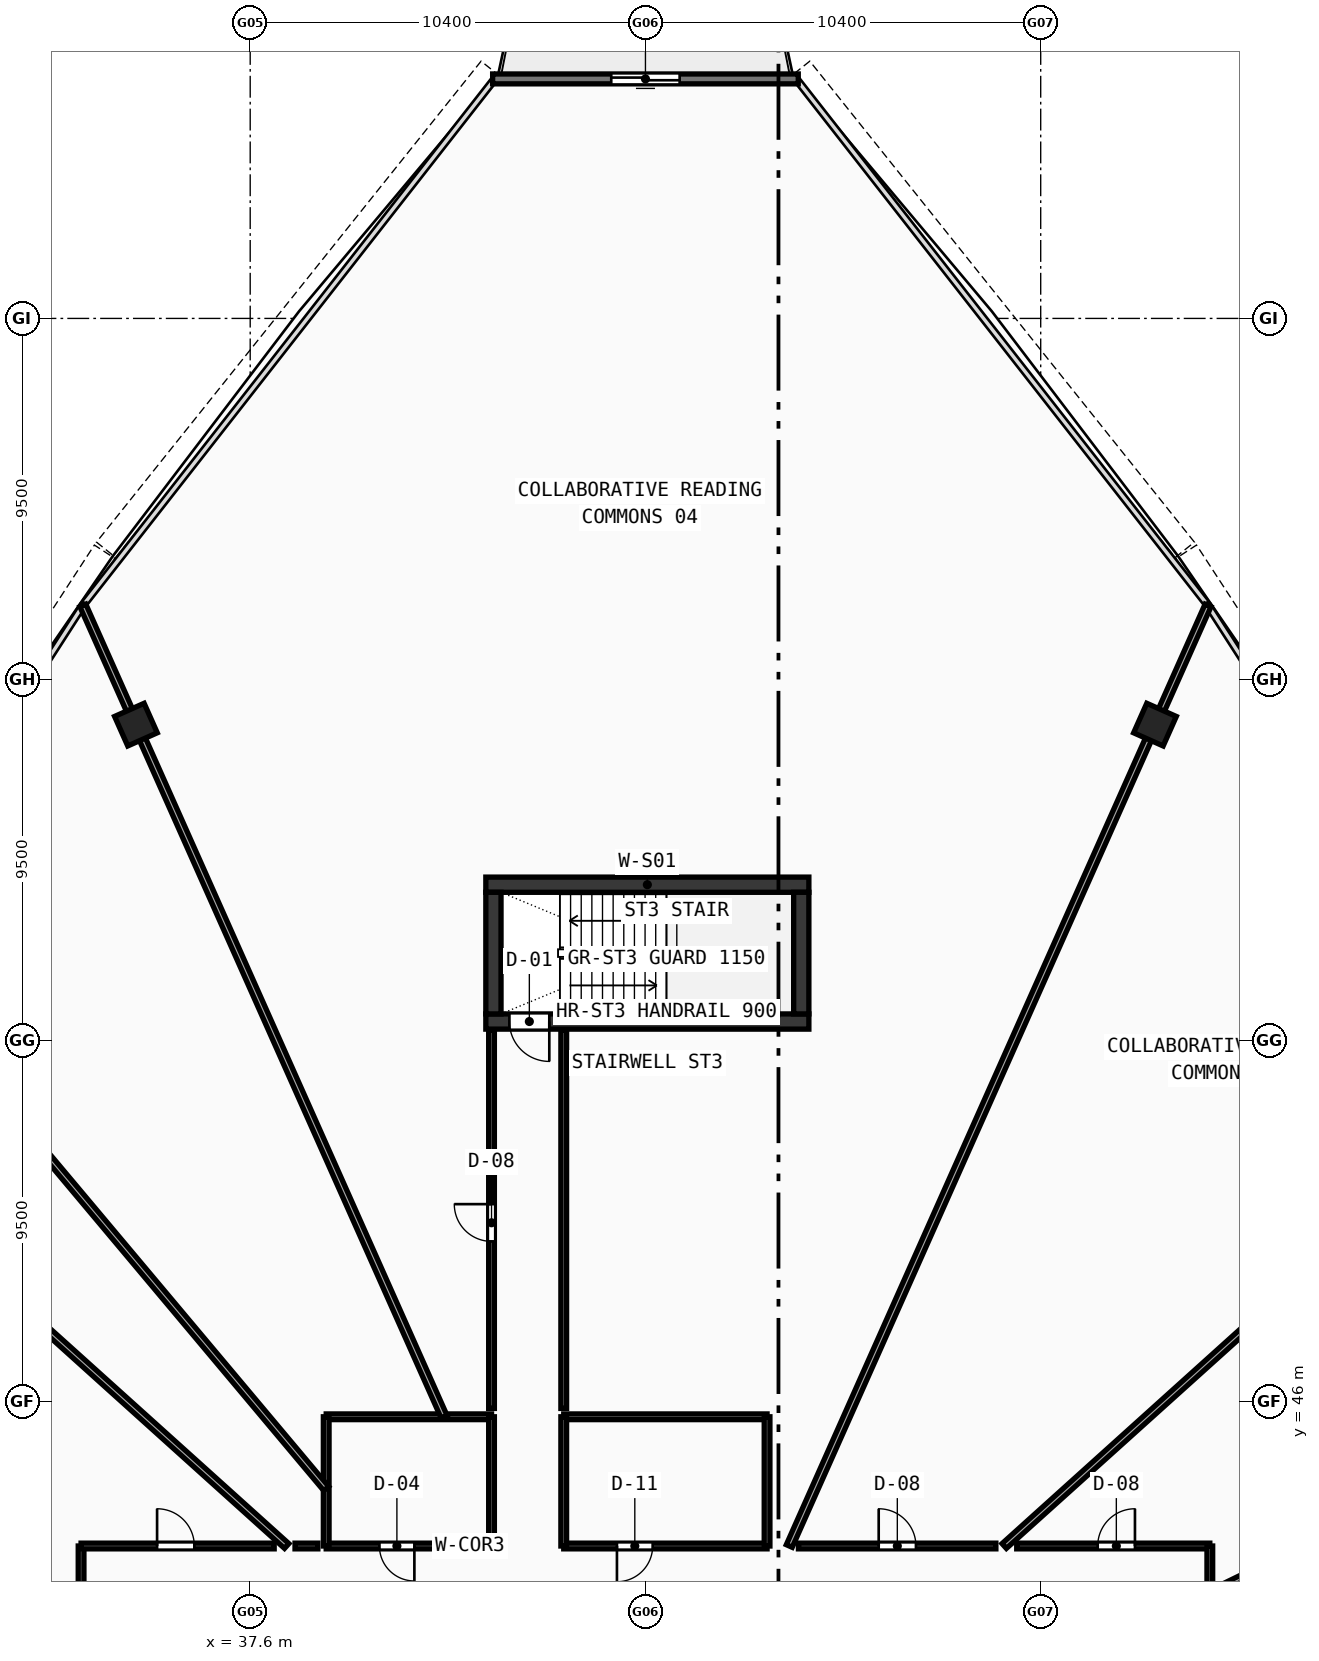
"""IFC4 building model, lengths in metres.
Left out: names, types, materials, properties, quantities, classifications, styles, units other than length and angle.
Written with IfcOpenShell. Run it as: python <this file> out.ifc"""

import sys

from ifc_helpers import new_model, si_unit, direction, frame, frame_2d, origin, origin_with_axes, origin_2d, place, context, subcontext, project, spatial, rectangle, hollow_rectangle, extrude, source, transform, mapped, element, fill, save


model = new_model("IFC4")
c1 = context("Model", 3, precision=1e-05, world=origin(), true_north=direction((0.0, 1.0)))
c2 = subcontext(c1, "Body", "Model", "MODEL_VIEW")
j1 = project(units=[si_unit("LENGTHUNIT", "METRE"), si_unit("PLANEANGLEUNIT", "RADIAN")], contexts=[c1])
p1 = place(None, origin())
s1 = spatial("IfcSite", under=j1, at=p1, CompositionType="ELEMENT")
p2 = place(p1, origin())
s2 = spatial("IfcBuilding", under=s1, at=p2, CompositionType="ELEMENT")
p3 = place(p2, frame((0.0, 0.0, 229.61)))
s3 = spatial("IfcBuildingStorey", under=s2, at=p3, CompositionType="ELEMENT", Elevation=229.61)
p4 = place(p3, frame((43.8, 59.6, 0.0), z_axis=(0.0, 0.0, 1.0), x_axis=(1.0, 0.0, 0.0)))
e1 = element("IfcWall", 1, at=p4, inside=s3, PredefinedType="SHEAR", context=c2, shape_type="SweptSolid", body=[
    extrude(rectangle(XDim=8.5, YDim=0.4, at=frame_2d((4.25, 0.0))), origin(), (0.0, 0.0, 1.0), 3.47),
])
p5 = place(p3, frame((43.8, 56.0, 0.0), z_axis=(0.0, 0.0, 1.0), x_axis=(1.0, 0.0, 0.0)))
e2 = element("IfcWall", 2, at=p5, inside=s3, PredefinedType="SHEAR", context=c2, shape_type="SweptSolid", body=[
    extrude(rectangle(XDim=8.5, YDim=0.4, at=frame_2d((4.25, 0.0))), origin(), (0.0, 0.0, 1.0), 3.47),
])
p6 = place(p5, frame((0.62, 0.0, 0.0)))
e3 = element("IfcOpeningElement", 3, at=p6, cuts=e2, PredefinedType="OPENING", context=c2, shape_type="SweptSolid", body=[
    extrude(rectangle(XDim=1.05, YDim=2.1, at=frame_2d((0.525, 1.05))), frame((0.0, 0.21, 0.0), z_axis=(0.0, -1.0, 0.0), x_axis=(1.0, 0.0, 0.0)), (0.0, 0.0, 1.0), 0.42),
])
for number, where, z_axis, x_axis in (
    (4, (44.0, 56.2, 0.0), (0.0, 0.0, 1.0), (0.0, 1.0, 0.0)),
    (5, (52.1, 56.2, 0.0), (0.0, 0.0, 1.0), (0.0, 1.0, 0.0)),
):
    element("IfcWall", number, at=place(p3, frame(where, z_axis=z_axis, x_axis=x_axis)), inside=s3, PredefinedType="SHEAR", context=c2, shape_type="SweptSolid", body=[
        extrude(rectangle(XDim=3.2, YDim=0.4, at=frame_2d((1.6, 0.0))), origin(), (0.0, 0.0, 1.0), 3.47),
    ])
m1 = source(origin(), c2, "Body", "SweptSolid", [
    extrude(hollow_rectangle(XDim=0.85, YDim=0.85, WallThickness=0.034, at=origin_2d()), origin(), (0.0, 0.0, 1.0), 3.73),
])
for number, where, z_axis, x_axis in (
    (6, (61.407, 63.812, -0.26), (0.0, 0.0, 1.0), (-0.914, 0.407, 0.0)),
    (7, (34.593, 63.812, -0.26), (0.0, 0.0, 1.0), (-0.914, -0.407, 0.0)),
):
    element("IfcColumn", number, at=place(p3, frame(where, z_axis=z_axis, x_axis=x_axis)), inside=s3, PredefinedType="COLUMN", context=c2, shape_type="MappedRepresentation", body=[
        mapped(m1, transform((0.0, 0.0, 0.0), scale=1.0)),
    ])
p7 = place(p3, frame((52.021, 80.802, 0.0), z_axis=(0.0, 0.0, 1.0), x_axis=(-1.0, 0.0, 0.0)))
e8 = element("IfcWall", 8, at=p7, inside=s3, PredefinedType="STANDARD", context=c2, shape_type="SweptSolid", body=[
    extrude(rectangle(XDim=8.042, YDim=0.26, at=frame_2d((4.021, 0.0))), origin(), (0.0, 0.0, 1.0), 3.47),
])
p8 = place(p7, frame((3.121, 0.0, 0.0)))
e9 = element("IfcOpeningElement", 9, at=p8, cuts=e8, PredefinedType="OPENING", context=c2, shape_type="SweptSolid", body=[
    extrude(rectangle(XDim=1.8, YDim=2.15, at=frame_2d((0.9, 1.075))), frame((0.0, 0.14, 0.0), z_axis=(0.0, -1.0, 0.0), x_axis=(1.0, 0.0, 0.0)), (0.0, 0.0, 1.0), 0.28),
])
p9 = place(p3, frame((39.6, 42.2, 0.0), z_axis=(0.0, 0.0, 1.0), x_axis=(1.0, 0.0, 0.0)))
e10 = element("IfcWall", 10, at=p9, inside=s3, PredefinedType="PARTITIONING", context=c2, shape_type="SweptSolid", body=[
    extrude(rectangle(XDim=4.35, YDim=0.15, at=frame_2d((2.175, 0.0))), origin(), (0.0, 0.0, 1.0), 3.47),
])
p10 = place(p9, frame((1.4, 0.0, 0.0)))
e11 = element("IfcOpeningElement", 11, at=p10, cuts=e10, PredefinedType="OPENING", context=c2, shape_type="SweptSolid", body=[
    extrude(rectangle(XDim=0.92, YDim=2.1, at=frame_2d((0.46, 1.05))), frame((0.0, 0.085, 0.0), z_axis=(0.0, -1.0, 0.0), x_axis=(1.0, 0.0, 0.0)), (0.0, 0.0, 1.0), 0.17),
])
p11 = place(p3, frame((39.6, 45.6, 0.0), z_axis=(0.0, 0.0, 1.0), x_axis=(1.0, 0.0, 0.0)))
e12 = element("IfcWall", 12, at=p11, inside=s3, PredefinedType="PARTITIONING", context=c2, shape_type="SweptSolid", body=[
    extrude(rectangle(XDim=4.35, YDim=0.15, at=frame_2d((2.175, 0.0))), origin(), (0.0, 0.0, 1.0), 2.82),
])
p12 = place(p3, frame((39.6, 42.2, 0.0), z_axis=(0.0, 0.0, 1.0), x_axis=(0.0, 1.0, 0.0)))
e13 = element("IfcWall", 13, at=p12, inside=s3, PredefinedType="PARTITIONING", context=c2, shape_type="SweptSolid", body=[
    extrude(rectangle(XDim=3.4, YDim=0.15, at=frame_2d((1.7, 0.0))), origin(), (0.0, 0.0, 1.0), 3.47),
])
p13 = place(p3, frame((43.95, 42.2, 0.0), z_axis=(0.0, 0.0, 1.0), x_axis=(0.0, 1.0, 0.0)))
e14 = element("IfcWall", 14, at=p13, inside=s3, PredefinedType="PARTITIONING", context=c2, shape_type="SweptSolid", body=[
    extrude(rectangle(XDim=3.4, YDim=0.15, at=frame_2d((1.7, 0.0))), origin(), (0.0, 0.0, 1.0), 2.82),
])
p14 = place(p3, frame((45.85, 42.2, 0.0), z_axis=(0.0, 0.0, 1.0), x_axis=(1.0, 0.0, 0.0)))
e15 = element("IfcWall", 15, at=p14, inside=s3, PredefinedType="PARTITIONING", context=c2, shape_type="SweptSolid", body=[
    extrude(rectangle(XDim=5.35, YDim=0.15, at=frame_2d((2.675, 0.0))), origin(), (0.0, 0.0, 1.0), 3.47),
])
p15 = place(p14, frame((1.4, 0.0, 0.0)))
e16 = element("IfcOpeningElement", 16, at=p15, cuts=e15, PredefinedType="OPENING", context=c2, shape_type="SweptSolid", body=[
    extrude(rectangle(XDim=0.94, YDim=2.1, at=frame_2d((0.47, 1.05))), frame((0.0, 0.085, 0.0), z_axis=(0.0, -1.0, 0.0), x_axis=(1.0, 0.0, 0.0)), (0.0, 0.0, 1.0), 0.17),
])
p16 = place(p3, frame((45.85, 45.6, 0.0), z_axis=(0.0, 0.0, 1.0), x_axis=(1.0, 0.0, 0.0)))
e17 = element("IfcWall", 17, at=p16, inside=s3, PredefinedType="PARTITIONING", context=c2, shape_type="SweptSolid", body=[
    extrude(rectangle(XDim=5.35, YDim=0.15, at=frame_2d((2.675, 0.0))), origin(), (0.0, 0.0, 1.0), 3.47),
])
for number, where, z_axis, x_axis in (
    (18, (45.85, 42.2, 0.0), (0.0, 0.0, 1.0), (0.0, 1.0, 0.0)),
    (19, (51.2, 42.2, 0.0), (0.0, 0.0, 1.0), (0.0, 1.0, 0.0)),
):
    element("IfcWall", number, at=place(p3, frame(where, z_axis=z_axis, x_axis=x_axis)), inside=s3, PredefinedType="PARTITIONING", context=c2, shape_type="SweptSolid", body=[
        extrude(rectangle(XDim=3.4, YDim=0.15, at=frame_2d((1.7, 0.0))), origin(), (0.0, 0.0, 1.0), 3.47),
    ])
p17 = place(p3, frame((62.85, 40.943, 0.0), z_axis=(0.0, 0.0, 1.0), x_axis=(0.89879807188, 0.438362893029, 0.0)))
e20 = element("IfcWall", 20, at=p17, inside=s3, PredefinedType="PARTITIONING", context=c2, shape_type="SweptSolid", body=[
    extrude(rectangle(XDim=13.384, YDim=0.17, at=frame_2d((6.692, 0.0))), origin(), (0.0, 0.0, 1.0), 2.82),
])
p18 = place(p3, frame((57.44, 42.2, 0.0), z_axis=(0.0, 0.0, 1.0), x_axis=(0.743147575456, 0.669127552185, 0.0)))
e21 = element("IfcWall", 21, at=p18, inside=s3, PredefinedType="PARTITIONING", context=c2, shape_type="SweptSolid", body=[
    extrude(rectangle(XDim=18.141, YDim=0.17, at=frame_2d((9.07, 0.0))), origin(), (0.0, 0.0, 1.0), 2.82),
])
p19 = place(p3, frame((51.784, 42.2, 0.0), z_axis=(0.0, 0.0, 1.0), x_axis=(0.406737084028, 0.913545261318, 0.0)))
e22 = element("IfcWall", 22, at=p19, inside=s3, PredefinedType="PARTITIONING", context=c2, shape_type="SweptSolid", body=[
    extrude(rectangle(XDim=27.09, YDim=0.17, at=frame_2d((13.545, 0.0))), origin(), (0.0, 0.0, 1.0), 2.82),
])
p20 = place(p3, frame((42.702, 45.6, 0.0), z_axis=(0.0, 0.0, 1.0), x_axis=(-0.406743256781, 0.913542513003, 0.0)))
e23 = element("IfcWall", 23, at=p20, inside=s3, PredefinedType="PARTITIONING", context=c2, shape_type="SweptSolid", body=[
    extrude(rectangle(XDim=23.368, YDim=0.17, at=frame_2d((11.684, 0.0))), origin(), (0.0, 0.0, 1.0), 2.82),
])
p21 = place(p3, frame((39.6, 43.711, 0.0), z_axis=(0.0, 0.0, 1.0), x_axis=(-0.642791950905, 0.766040800383, 0.0)))
e24 = element("IfcWall", 24, at=p21, inside=s3, PredefinedType="PARTITIONING", context=c2, shape_type="SweptSolid", body=[
    extrude(rectangle(XDim=18.806, YDim=0.17, at=frame_2d((9.403, 0.0))), origin(), (0.0, 0.0, 1.0), 2.82),
])
p22 = place(p3, frame((38.56, 42.2, 0.0), z_axis=(0.0, 0.0, 1.0), x_axis=(-0.743147575456, 0.669127552185, 0.0)))
e25 = element("IfcWall", 25, at=p22, inside=s3, PredefinedType="PARTITIONING", context=c2, shape_type="SweptSolid", body=[
    extrude(rectangle(XDim=18.141, YDim=0.17, at=frame_2d((9.07, 0.0))), origin(), (0.0, 0.0, 1.0), 2.82),
])
p23 = place(p3, frame((33.15, 38.525, 0.0), z_axis=(0.0, 0.0, 1.0), x_axis=(-0.951058452106, 0.309011036497, 0.0)))
e26 = element("IfcWall", 26, at=p23, inside=s3, PredefinedType="PARTITIONING", context=c2, shape_type="SweptSolid", body=[
    extrude(rectangle(XDim=14.714, YDim=0.17, at=frame_2d((7.357, 0.0))), origin(), (0.0, 0.0, 1.0), 2.82),
])
p24 = place(p3, frame((33.15, 38.756, 0.0), z_axis=(0.0, 0.0, 1.0), x_axis=(0.0, 1.0, 0.0)))
e27 = element("IfcWall", 27, at=p24, inside=s3, PredefinedType="PARTITIONING", context=c2, shape_type="SweptSolid", body=[
    extrude(rectangle(XDim=3.444, YDim=0.15, at=frame_2d((1.722, 0.0))), origin(), (0.0, 0.0, 1.0), 3.12),
])
p25 = place(p3, frame((33.15, 42.2, 0.0), z_axis=(0.0, 0.0, 1.0), x_axis=(1.0, 0.0, 0.0)))
e28 = element("IfcWall", 28, at=p25, inside=s3, PredefinedType="PARTITIONING", context=c2, shape_type="SweptSolid", body=[
    extrude(rectangle(XDim=5.081, YDim=0.15, at=frame_2d((2.541, 0.0))), origin(), (0.0, 0.0, 1.0), 3.12),
])
p26 = place(p25, frame((2.0, 0.0, 0.0)))
e29 = element("IfcOpeningElement", 29, at=p26, cuts=e28, PredefinedType="OPENING", context=c2, shape_type="SweptSolid", body=[
    extrude(rectangle(XDim=0.98, YDim=2.12, at=frame_2d((0.49, 1.06))), frame((0.0, 0.085, 0.0), z_axis=(0.0, -1.0, 0.0), x_axis=(1.0, 0.0, 0.0)), (0.0, 0.0, 1.0), 0.17),
])
p27 = place(p3, frame((38.78, 42.2, 0.0), z_axis=(0.0, 0.0, 1.0), x_axis=(1.0, 0.0, 0.0)))
e30 = element("IfcWall", 30, at=p27, inside=s3, PredefinedType="PARTITIONING", context=c2, shape_type="SweptSolid", body=[
    extrude(rectangle(XDim=0.6, YDim=0.15, at=frame_2d((0.3, 0.0))), origin(), (0.0, 0.0, 1.0), 2.82),
])
p28 = place(p3, frame((43.95, 45.82, 0.0), z_axis=(0.0, 0.0, 1.0), x_axis=(0.0, 1.0, 0.0)))
e31 = element("IfcWall", 31, at=p28, inside=s3, PredefinedType="PARTITIONING", context=c2, shape_type="SweptSolid", body=[
    extrude(rectangle(XDim=9.96, YDim=0.15, at=frame_2d((4.98, 0.0))), origin(), (0.0, 0.0, 1.0), 3.12),
])
p29 = place(p28, frame((4.395, 0.0, 0.0)))
e32 = element("IfcOpeningElement", 32, at=p29, cuts=e31, PredefinedType="OPENING", context=c2, shape_type="SweptSolid", body=[
    extrude(rectangle(XDim=0.98, YDim=2.12, at=frame_2d((0.49, 1.06))), frame((0.0, 0.085, 0.0), z_axis=(0.0, -1.0, 0.0), x_axis=(1.0, 0.0, 0.0)), (0.0, 0.0, 1.0), 0.17),
])
p30 = place(p3, frame((45.85, 55.78, 0.0), z_axis=(0.0, 0.0, 1.0), x_axis=(0.0, -1.0, 0.0)))
e33 = element("IfcWall", 33, at=p30, inside=s3, PredefinedType="PARTITIONING", context=c2, shape_type="SweptSolid", body=[
    extrude(rectangle(XDim=9.96, YDim=0.15, at=frame_2d((4.98, 0.0))), origin(), (0.0, 0.0, 1.0), 3.12),
])
p31 = place(p3, frame((52.025, 42.2, 0.0), z_axis=(0.0, 0.0, 1.0), x_axis=(1.0, 0.0, 0.0)))
e34 = element("IfcWall", 34, at=p31, inside=s3, PredefinedType="PARTITIONING", context=c2, shape_type="SweptSolid", body=[
    extrude(rectangle(XDim=5.195, YDim=0.15, at=frame_2d((2.598, 0.0))), origin(), (0.0, 0.0, 1.0), 2.82),
])
p32 = place(p31, frame((2.112, 0.0, 0.0)))
e35 = element("IfcOpeningElement", 35, at=p32, cuts=e34, PredefinedType="OPENING", context=c2, shape_type="SweptSolid", body=[
    extrude(rectangle(XDim=0.98, YDim=2.12, at=frame_2d((0.49, 1.06))), frame((0.0, 0.085, 0.0), z_axis=(0.0, -1.0, 0.0), x_axis=(1.0, 0.0, 0.0)), (0.0, 0.0, 1.0), 0.17),
])
p33 = place(p3, frame((57.769, 42.2, 0.0), z_axis=(0.0, 0.0, 1.0), x_axis=(1.0, 0.0, 0.0)))
e36 = element("IfcWall", 36, at=p33, inside=s3, PredefinedType="PARTITIONING", context=c2, shape_type="SweptSolid", body=[
    extrude(rectangle(XDim=5.081, YDim=0.15, at=frame_2d((2.541, 0.0))), origin(), (0.0, 0.0, 1.0), 3.12),
])
p34 = place(p33, frame((2.131, 0.0, 0.0)))
e37 = element("IfcOpeningElement", 37, at=p34, cuts=e36, PredefinedType="OPENING", context=c2, shape_type="SweptSolid", body=[
    extrude(rectangle(XDim=0.98, YDim=2.12, at=frame_2d((0.49, 1.06))), frame((0.0, 0.085, 0.0), z_axis=(0.0, -1.0, 0.0), x_axis=(1.0, 0.0, 0.0)), (0.0, 0.0, 1.0), 0.17),
])
p35 = place(p3, frame((62.85, 42.2, 0.0), z_axis=(0.0, 0.0, 1.0), x_axis=(0.0, -1.0, 0.0)))
e38 = element("IfcWall", 38, at=p35, inside=s3, PredefinedType="PARTITIONING", context=c2, shape_type="SweptSolid", body=[
    extrude(rectangle(XDim=1.012, YDim=0.15, at=frame_2d((0.506, 0.0))), origin(), (0.0, 0.0, 1.0), 3.12),
])
m2 = source(origin(), c2, "Body", "SweptSolid", [
    extrude(rectangle(XDim=1.8, YDim=2.15, at=frame_2d((0.9, 1.075))), frame((0.0, 0.025, 0.0), z_axis=(0.0, -1.0, 0.0), x_axis=(1.0, 0.0, 0.0)), (0.0, 0.0, 1.0), 0.05),
])
p36 = place(p8, origin_with_axes())
e39 = element("IfcDoor", 39, at=p36, inside=s3, OperationType="DOUBLE_DOOR_SLIDING", PredefinedType="DOOR", context=c2, shape_type="MappedRepresentation", body=[
    mapped(m2, transform((0.0, 0.0, 0.0), scale=1.0)),
])
fill(e9, e39)
m3 = source(origin(), c2, "Body", "SweptSolid", [
    extrude(rectangle(XDim=1.05, YDim=2.1, at=frame_2d((0.525, 1.05))), frame((0.0, 0.025, 0.0), z_axis=(0.0, -1.0, 0.0), x_axis=(1.0, 0.0, 0.0)), (0.0, 0.0, 1.0), 0.05),
])
p37 = place(p6, frame((1.05, 0.0, 0.0), z_axis=(0.0, 0.0, 1.0), x_axis=(-1.0, 0.0, 0.0)))
e40 = element("IfcDoor", 40, at=p37, inside=s3, OperationType="SINGLE_SWING_LEFT", PredefinedType="DOOR", context=c2, shape_type="MappedRepresentation", body=[
    mapped(m3, transform((0.0, 0.0, 0.0), scale=1.0)),
])
fill(e3, e40)
m4 = source(origin(), c2, "Body", "SweptSolid", [
    extrude(rectangle(XDim=0.92, YDim=2.1, at=frame_2d((0.46, 1.05))), frame((0.0, 0.025, 0.0), z_axis=(0.0, -1.0, 0.0), x_axis=(1.0, 0.0, 0.0)), (0.0, 0.0, 1.0), 0.05),
])
p38 = place(p10, frame((0.92, 0.0, 0.0), z_axis=(0.0, 0.0, 1.0), x_axis=(-1.0, 0.0, 0.0)))
e41 = element("IfcDoor", 41, at=p38, inside=s3, OperationType="SINGLE_SWING_LEFT", PredefinedType="DOOR", context=c2, shape_type="MappedRepresentation", body=[
    mapped(m4, transform((0.0, 0.0, 0.0), scale=1.0)),
])
fill(e11, e41)
m5 = source(origin(), c2, "Body", "SweptSolid", [
    extrude(rectangle(XDim=0.94, YDim=2.1, at=frame_2d((0.47, 1.05))), frame((0.0, 0.025, 0.0), z_axis=(0.0, -1.0, 0.0), x_axis=(1.0, 0.0, 0.0)), (0.0, 0.0, 1.0), 0.05),
])
p39 = place(p15, frame((0.94, 0.0, 0.0), z_axis=(0.0, 0.0, 1.0), x_axis=(-1.0, 0.0, 0.0)))
e42 = element("IfcDoor", 42, at=p39, inside=s3, OperationType="SINGLE_SWING_RIGHT", PredefinedType="DOOR", context=c2, shape_type="MappedRepresentation", body=[
    mapped(m5, transform((0.0, 0.0, 0.0), scale=1.0)),
])
fill(e16, e42)
m6 = source(origin(), c2, "Body", "SweptSolid", [
    extrude(rectangle(XDim=0.98, YDim=2.12, at=frame_2d((0.49, 1.06))), frame((0.0, 0.025, 0.0), z_axis=(0.0, -1.0, 0.0), x_axis=(1.0, 0.0, 0.0)), (0.0, 0.0, 1.0), 0.05),
])
p40 = place(p34, origin_with_axes())
e43 = element("IfcDoor", 43, at=p40, inside=s3, OperationType="SINGLE_SWING_RIGHT", PredefinedType="DOOR", context=c2, shape_type="MappedRepresentation", body=[
    mapped(m6, transform((0.0, 0.0, 0.0), scale=1.0)),
])
fill(e37, e43)
p41 = place(p32, origin_with_axes())
e44 = element("IfcDoor", 44, at=p41, inside=s3, OperationType="SINGLE_SWING_LEFT", PredefinedType="DOOR", context=c2, shape_type="MappedRepresentation", body=[
    mapped(m6, transform((0.0, 0.0, 0.0), scale=1.0)),
])
fill(e35, e44)
p42 = place(p29, origin_with_axes())
e45 = element("IfcDoor", 45, at=p42, inside=s3, OperationType="SINGLE_SWING_RIGHT", PredefinedType="DOOR", context=c2, shape_type="MappedRepresentation", body=[
    mapped(m6, transform((0.0, 0.0, 0.0), scale=1.0)),
])
fill(e32, e45)
p43 = place(p26, origin_with_axes())
e46 = element("IfcDoor", 46, at=p43, inside=s3, OperationType="SINGLE_SWING_LEFT", PredefinedType="DOOR", context=c2, shape_type="MappedRepresentation", body=[
    mapped(m6, transform((0.0, 0.0, 0.0), scale=1.0)),
])
fill(e29, e46)
save(model, sys.argv[1])
